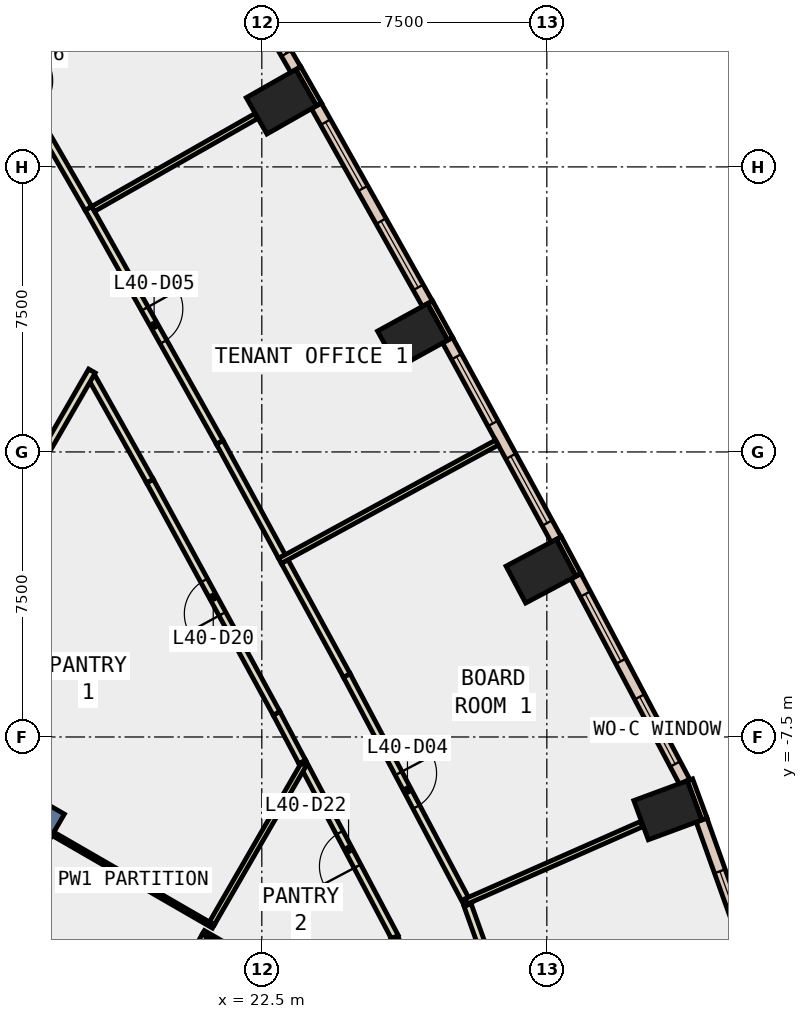
"""IFC4 building model, lengths in metres.
Left out: names, types, materials, properties, quantities, classifications, styles, units other than length and angle.
Written with IfcOpenShell. Run it as: python <this file> out.ifc"""

import sys

from ifc_helpers import new_model, si_unit, direction, frame, frame_2d, origin, origin_2d, place, context, subcontext, project, spatial, rectangle, extrude, element, fill, save


model = new_model("IFC4")
c1 = context("Model", 3, precision=1e-05, world=origin(), true_north=direction((0.0, 1.0)))
c2 = subcontext(c1, "Body", "Model", "MODEL_VIEW")
j1 = project(units=[si_unit("LENGTHUNIT", "METRE"), si_unit("PLANEANGLEUNIT", "RADIAN")], contexts=[c1])
p1 = place(None, origin())
s1 = spatial("IfcSite", under=j1, at=p1, CompositionType="ELEMENT")
p2 = place(p1, origin())
s2 = spatial("IfcBuilding", under=s1, at=p2, CompositionType="ELEMENT")
p3 = place(p2, frame((0.0, 0.0, 180.2)))
s3 = spatial("IfcBuildingStorey", under=s2, at=p3, CompositionType="ELEMENT", Elevation=180.2)
for number, where, z_axis, x_axis in (
    (1, (33.183, -9.429, -0.4), (0.0, 0.0, 1.0), (-0.347, 0.938, 0.0)),
    (2, (29.847, -3.138, -0.4), (0.0, 0.0, 1.0), (-0.47, 0.883, 0.0)),
    (3, (26.468, 3.059, -0.4), (0.0, 0.0, 1.0), (-0.482, 0.876, 0.0)),
    (4, (23.015, 9.214, -0.4), (0.0, 0.0, 1.0), (-0.494, 0.869, 0.0)),
):
    element("IfcColumn", number, at=place(p3, frame(where, z_axis=z_axis, x_axis=x_axis)), inside=s3, PredefinedType="COLUMN", context=c2, shape_type="SweptSolid", body=[
        extrude(rectangle(XDim=1.1, YDim=1.5, at=origin_2d()), origin(), (0.0, 0.0, 1.0), 4.0),
    ])
p4 = place(p3, frame((9.31, -5.375, -0.4), z_axis=(0.0, 0.0, 1.0), x_axis=(0.866017533419, -0.500013631625, 0.0)))
e5 = element("IfcWall", 5, at=p4, inside=s3, PredefinedType="SHEAR", context=c2, shape_type="SweptSolid", body=[
    extrude(rectangle(XDim=9.0, YDim=0.8, at=frame_2d((4.5, 0.0))), origin(), (0.0, 0.0, 1.0), 4.0),
])
p5 = place(p3, frame((34.147, -9.659, 0.0), z_axis=(0.0, 0.0, 1.0), x_axis=(-0.346229846278, 0.938149718087, 0.0)))
e6 = element("IfcWall", 6, at=p5, inside=s3, PredefinedType="STANDARD", context=c2, shape_type="SweptSolid", body=[
    extrude(rectangle(XDim=1.1, YDim=0.15, at=frame_2d((0.55, 0.0))), origin(), (0.0, 0.0, 1.0), 3.6),
])
p6 = place(p3, frame((30.833, -3.236, 0.0), z_axis=(0.0, 0.0, 1.0), x_axis=(-0.469966207956, 0.882684407577, 0.0)))
e7 = element("IfcWall", 7, at=p6, inside=s3, PredefinedType="STANDARD", context=c2, shape_type="SweptSolid", body=[
    extrude(rectangle(XDim=1.1, YDim=0.15, at=frame_2d((0.55, 0.0))), origin(), (0.0, 0.0, 1.0), 3.6),
])
p7 = place(p3, frame((27.456, 2.975, 0.0), z_axis=(0.0, 0.0, 1.0), x_axis=(-0.481850587491, 0.876253394478, 0.0)))
e8 = element("IfcWall", 8, at=p7, inside=s3, PredefinedType="STANDARD", context=c2, shape_type="SweptSolid", body=[
    extrude(rectangle(XDim=1.1, YDim=0.15, at=frame_2d((0.55, 0.0))), origin(), (0.0, 0.0, 1.0), 3.6),
])
p8 = place(p3, frame((24.005, 9.144, 0.0), z_axis=(0.0, 0.0, 1.0), x_axis=(-0.494512685492, 0.869170411305, 0.0)))
e9 = element("IfcWall", 9, at=p8, inside=s3, PredefinedType="STANDARD", context=c2, shape_type="SweptSolid", body=[
    extrude(rectangle(XDim=1.1, YDim=0.15, at=frame_2d((0.55, 0.0))), origin(), (0.0, 0.0, 1.0), 3.6),
])
p9 = place(p3, frame((35.506, -13.7, 0.0), z_axis=(0.0, 0.0, 1.0), x_axis=(-0.336652028742, 0.941629126325, 0.0)))
e10 = element("IfcWall", 10, at=p9, inside=s3, PredefinedType="STANDARD", context=c2, shape_type="SweptSolid", body=[
    extrude(rectangle(XDim=4.263, YDim=0.3, at=frame_2d((2.131, 0.0))), origin(), (0.0, 0.0, 1.0), 3.6),
])
p10 = place(p9, frame((1.431, 0.0, 0.9)))
e11 = element("IfcOpeningElement", 11, at=p10, cuts=e10, PredefinedType="OPENING", context=c2, shape_type="SweptSolid", body=[
    extrude(rectangle(XDim=1.4, YDim=2.6, at=frame_2d((0.7, 1.3))), frame((0.0, 0.16, 0.0), z_axis=(0.0, -1.0, 0.0), x_axis=(1.0, 0.0, 0.0)), (0.0, 0.0, 1.0), 0.32),
])
p11 = place(p3, frame((33.626, -8.68, 0.0), z_axis=(0.0, 0.0, 1.0), x_axis=(-0.467572383403, 0.883954787463, 0.0)))
e12 = element("IfcWall", 12, at=p11, inside=s3, PredefinedType="STANDARD", context=c2, shape_type="SweptSolid", body=[
    extrude(rectangle(XDim=6.119, YDim=0.3, at=frame_2d((3.06, 0.0))), origin(), (0.0, 0.0, 1.0), 3.6),
])
p12 = place(p11, frame((0.53, 0.0, 0.9)))
e13 = element("IfcOpeningElement", 13, at=p12, cuts=e12, PredefinedType="OPENING", context=c2, shape_type="SweptSolid", body=[
    extrude(rectangle(XDim=2.0, YDim=2.6, at=frame_2d((1.0, 1.3))), frame((0.0, 0.16, 0.0), z_axis=(0.0, -1.0, 0.0), x_axis=(1.0, 0.0, 0.0)), (0.0, 0.0, 1.0), 0.32),
])
p13 = place(p11, frame((3.589, 0.0, 0.9)))
e14 = element("IfcOpeningElement", 14, at=p13, cuts=e12, PredefinedType="OPENING", context=c2, shape_type="SweptSolid", body=[
    extrude(rectangle(XDim=2.0, YDim=2.6, at=frame_2d((1.0, 1.3))), frame((0.0, 0.16, 0.0), z_axis=(0.0, -1.0, 0.0), x_axis=(1.0, 0.0, 0.0)), (0.0, 0.0, 1.0), 0.32),
])
p14 = place(p3, frame((30.246, -2.303, 0.0), z_axis=(0.0, 0.0, 1.0), x_axis=(-0.478711740571, 0.877972134774, 0.0)))
e15 = element("IfcWall", 15, at=p14, inside=s3, PredefinedType="STANDARD", context=c2, shape_type="SweptSolid", body=[
    extrude(rectangle(XDim=5.97, YDim=0.3, at=frame_2d((2.985, 0.0))), origin(), (0.0, 0.0, 1.0), 3.6),
])
p15 = place(p14, frame((0.493, 0.0, 0.9)))
e16 = element("IfcOpeningElement", 16, at=p15, cuts=e15, PredefinedType="OPENING", context=c2, shape_type="SweptSolid", body=[
    extrude(rectangle(XDim=2.0, YDim=2.6, at=frame_2d((1.0, 1.3))), frame((0.0, 0.16, 0.0), z_axis=(0.0, -1.0, 0.0), x_axis=(1.0, 0.0, 0.0)), (0.0, 0.0, 1.0), 0.32),
])
p16 = place(p14, frame((3.478, 0.0, 0.9)))
e17 = element("IfcOpeningElement", 17, at=p16, cuts=e15, PredefinedType="OPENING", context=c2, shape_type="SweptSolid", body=[
    extrude(rectangle(XDim=2.0, YDim=2.6, at=frame_2d((1.0, 1.3))), frame((0.0, 0.16, 0.0), z_axis=(0.0, -1.0, 0.0), x_axis=(1.0, 0.0, 0.0)), (0.0, 0.0, 1.0), 0.32),
])
p17 = place(p3, frame((26.857, 3.9, 0.0), z_axis=(0.0, 0.0, 1.0), x_axis=(-0.489305602904, 0.872112393541, 0.0)))
e18 = element("IfcWall", 18, at=p17, inside=s3, PredefinedType="STANDARD", context=c2, shape_type="SweptSolid", body=[
    extrude(rectangle(XDim=5.969, YDim=0.3, at=frame_2d((2.985, 0.0))), origin(), (0.0, 0.0, 1.0), 3.6),
])
p18 = place(p17, frame((0.492, 0.0, 0.9)))
e19 = element("IfcOpeningElement", 19, at=p18, cuts=e18, PredefinedType="OPENING", context=c2, shape_type="SweptSolid", body=[
    extrude(rectangle(XDim=2.0, YDim=2.6, at=frame_2d((1.0, 1.3))), frame((0.0, 0.16, 0.0), z_axis=(0.0, -1.0, 0.0), x_axis=(1.0, 0.0, 0.0)), (0.0, 0.0, 1.0), 0.32),
])
p19 = place(p17, frame((3.477, 0.0, 0.9)))
e20 = element("IfcOpeningElement", 20, at=p19, cuts=e18, PredefinedType="OPENING", context=c2, shape_type="SweptSolid", body=[
    extrude(rectangle(XDim=2.0, YDim=2.6, at=frame_2d((1.0, 1.3))), frame((0.0, 0.16, 0.0), z_axis=(0.0, -1.0, 0.0), x_axis=(1.0, 0.0, 0.0)), (0.0, 0.0, 1.0), 0.32),
])
p20 = place(p3, frame((23.393, 10.06, 0.0), z_axis=(0.0, 0.0, 1.0), x_axis=(-0.499908916093, 0.866077984716, 0.0)))
e21 = element("IfcWall", 21, at=p20, inside=s3, PredefinedType="STANDARD", context=c2, shape_type="SweptSolid", body=[
    extrude(rectangle(XDim=5.969, YDim=0.3, at=frame_2d((2.985, 0.0))), origin(), (0.0, 0.0, 1.0), 3.6),
])
p21 = place(p20, frame((0.492, 0.0, 0.9)))
e22 = element("IfcOpeningElement", 22, at=p21, cuts=e21, PredefinedType="OPENING", context=c2, shape_type="SweptSolid", body=[
    extrude(rectangle(XDim=2.0, YDim=2.6, at=frame_2d((1.0, 1.3))), frame((0.0, 0.16, 0.0), z_axis=(0.0, -1.0, 0.0), x_axis=(1.0, 0.0, 0.0)), (0.0, 0.0, 1.0), 0.32),
])
p22 = place(p20, frame((3.477, 0.0, 0.9)))
e23 = element("IfcOpeningElement", 23, at=p22, cuts=e21, PredefinedType="OPENING", context=c2, shape_type="SweptSolid", body=[
    extrude(rectangle(XDim=2.0, YDim=2.6, at=frame_2d((1.0, 1.3))), frame((0.0, 0.16, 0.0), z_axis=(0.0, -1.0, 0.0), x_axis=(1.0, 0.0, 0.0)), (0.0, 0.0, 1.0), 0.32),
])
p23 = place(p3, frame((23.565, -8.158, 0.0), z_axis=(0.0, 0.0, 1.0), x_axis=(-0.46753134131, 0.883976495668, 0.0)))
e24 = element("IfcWall", 24, at=p23, inside=s3, PredefinedType="PARTITIONING", context=c2, shape_type="SweptSolid", body=[
    extrude(rectangle(XDim=1.448, YDim=0.2, at=frame_2d((0.724, 0.0))), origin(), (0.0, 0.0, 1.0), 3.6),
])
p24 = place(p3, frame((22.888, -6.878, 0.0), z_axis=(0.0, 0.0, 1.0), x_axis=(-0.478665365973, 0.877997418799, 0.0)))
e25 = element("IfcWall", 25, at=p24, inside=s3, PredefinedType="PARTITIONING", context=c2, shape_type="SweptSolid", body=[
    extrude(rectangle(XDim=6.961, YDim=0.2, at=frame_2d((3.48, 0.0))), origin(), (0.0, 0.0, 1.0), 3.6),
])
p25 = place(p24, frame((2.981, 0.0, 0.0)))
e26 = element("IfcOpeningElement", 26, at=p25, cuts=e25, PredefinedType="OPENING", context=c2, shape_type="SweptSolid", body=[
    extrude(rectangle(XDim=1.0, YDim=2.1, at=frame_2d((0.5, 1.05))), frame((0.0, 0.11, 0.0), z_axis=(0.0, -1.0, 0.0), x_axis=(1.0, 0.0, 0.0)), (0.0, 0.0, 1.0), 0.22),
])
p26 = place(p3, frame((19.556, -0.766, 0.0), z_axis=(0.0, 0.0, 1.0), x_axis=(-0.489198731197, 0.872172346154, 0.0)))
e27 = element("IfcWall", 27, at=p26, inside=s3, PredefinedType="PARTITIONING", context=c2, shape_type="SweptSolid", body=[
    extrude(rectangle(XDim=3.121, YDim=0.2, at=frame_2d((1.561, 0.0))), origin(), (0.0, 0.0, 1.0), 3.6),
])
p27 = place(p3, frame((26.758, -14.926, 0.0), z_axis=(0.0, 0.0, 1.0), x_axis=(-0.33645112914, 0.941700927949, 0.0)))
e28 = element("IfcWall", 28, at=p27, inside=s3, PredefinedType="PARTITIONING", context=c2, shape_type="SweptSolid", body=[
    extrude(rectangle(XDim=2.292, YDim=0.2, at=frame_2d((1.146, 0.0))), origin(), (0.0, 0.0, 1.0), 3.6),
])
p28 = place(p3, frame((26.0, -12.762, 0.0), z_axis=(0.0, 0.0, 1.0), x_axis=(-0.467534471159, 0.883974840297, 0.0)))
e29 = element("IfcWall", 29, at=p28, inside=s3, PredefinedType="PARTITIONING", context=c2, shape_type="SweptSolid", body=[
    extrude(rectangle(XDim=5.208, YDim=0.2, at=frame_2d((2.604, 0.0))), origin(), (0.0, 0.0, 1.0), 3.6),
])
p29 = place(p28, frame((2.104, 0.0, 0.0)))
e30 = element("IfcOpeningElement", 30, at=p29, cuts=e29, PredefinedType="OPENING", context=c2, shape_type="SweptSolid", body=[
    extrude(rectangle(XDim=1.0, YDim=2.1, at=frame_2d((0.5, 1.05))), frame((0.0, 0.11, 0.0), z_axis=(0.0, -1.0, 0.0), x_axis=(1.0, 0.0, 0.0)), (0.0, 0.0, 1.0), 0.22),
])
p30 = place(p3, frame((27.913, -11.919, 0.0), z_axis=(0.0, 0.0, 1.0), x_axis=(0.336864004528, -0.941553313654, 0.0)))
e31 = element("IfcWall", 31, at=p30, inside=s3, PredefinedType="PARTITIONING", context=c2, shape_type="SweptSolid", body=[
    extrude(rectangle(XDim=3.048, YDim=0.2, at=frame_2d((1.524, 0.0))), origin(), (0.0, 0.0, 1.0), 3.6),
])
p31 = place(p3, frame((23.102, -2.884, 0.0), z_axis=(0.0, 0.0, 1.0), x_axis=(0.478646929322, -0.878007469815, 0.0)))
e32 = element("IfcWall", 32, at=p31, inside=s3, PredefinedType="PARTITIONING", context=c2, shape_type="SweptSolid", body=[
    extrude(rectangle(XDim=3.418, YDim=0.2, at=frame_2d((1.709, 0.0))), origin(), (0.0, 0.0, 1.0), 3.6),
])
p32 = place(p3, frame((24.738, -5.885, 0.0), z_axis=(0.0, 0.0, 1.0), x_axis=(0.467616297571, -0.883931557444, 0.0)))
e33 = element("IfcWall", 33, at=p32, inside=s3, PredefinedType="PARTITIONING", context=c2, shape_type="SweptSolid", body=[
    extrude(rectangle(XDim=6.82, YDim=0.2, at=frame_2d((3.41, 0.0))), origin(), (0.0, 0.0, 1.0), 3.6),
])
p33 = place(p32, frame((2.91, 0.0, 0.0)))
e34 = element("IfcOpeningElement", 34, at=p33, cuts=e33, PredefinedType="OPENING", context=c2, shape_type="SweptSolid", body=[
    extrude(rectangle(XDim=1.0, YDim=2.1, at=frame_2d((0.5, 1.05))), frame((0.0, 0.11, 0.0), z_axis=(0.0, -1.0, 0.0), x_axis=(1.0, 0.0, 0.0)), (0.0, 0.0, 1.0), 0.22),
])
p34 = place(p3, frame((17.938, 6.411, 0.0), z_axis=(0.0, 0.0, 1.0), x_axis=(0.48930419744, -0.872113182086, 0.0)))
e35 = element("IfcWall", 35, at=p34, inside=s3, PredefinedType="PARTITIONING", context=c2, shape_type="SweptSolid", body=[
    extrude(rectangle(XDim=7.063, YDim=0.2, at=frame_2d((3.532, 0.0))), origin(), (0.0, 0.0, 1.0), 3.6),
])
p35 = place(p34, frame((3.032, 0.0, 0.0)))
e36 = element("IfcOpeningElement", 36, at=p35, cuts=e35, PredefinedType="OPENING", context=c2, shape_type="SweptSolid", body=[
    extrude(rectangle(XDim=1.0, YDim=2.1, at=frame_2d((0.5, 1.05))), frame((0.0, 0.11, 0.0), z_axis=(0.0, -1.0, 0.0), x_axis=(1.0, 0.0, 0.0)), (0.0, 0.0, 1.0), 0.22),
])
p36 = place(p3, frame((21.394, 0.251, 0.0), z_axis=(0.0, 0.0, 1.0), x_axis=(0.478406883784, -0.878138288397, 0.0)))
e37 = element("IfcWall", 37, at=p36, inside=s3, PredefinedType="PARTITIONING", context=c2, shape_type="SweptSolid", body=[
    extrude(rectangle(XDim=3.42, YDim=0.2, at=frame_2d((1.71, 0.0))), origin(), (0.0, 0.0, 1.0), 3.6),
])
p37 = place(p3, frame((14.482, 12.395, 0.0), z_axis=(0.0, 0.0, 1.0), x_axis=(0.499953847993, -0.866052048018, 0.0)))
e38 = element("IfcWall", 38, at=p37, inside=s3, PredefinedType="PARTITIONING", context=c2, shape_type="SweptSolid", body=[
    extrude(rectangle(XDim=6.911, YDim=0.2, at=frame_2d((3.456, 0.0))), origin(), (0.0, 0.0, 1.0), 3.6),
])
p38 = place(p37, frame((3.03, 0.0, 0.0)))
e39 = element("IfcOpeningElement", 39, at=p38, cuts=e38, PredefinedType="OPENING", context=c2, shape_type="SweptSolid", body=[
    extrude(rectangle(XDim=1.0, YDim=2.1, at=frame_2d((0.5, 1.05))), frame((0.0, 0.11, 0.0), z_axis=(0.0, -1.0, 0.0), x_axis=(1.0, 0.0, 0.0)), (0.0, 0.0, 1.0), 0.22),
])
p39 = place(p3, frame((18.03, 2.13, 0.0), z_axis=(0.0, 0.0, 1.0), x_axis=(-0.499919790729, -0.866071707676, 0.0)))
e40 = element("IfcWall", 40, at=p39, inside=s3, PredefinedType="PARTITIONING", context=c2, shape_type="SweptSolid", body=[
    extrude(rectangle(XDim=10.46, YDim=0.2, at=frame_2d((5.23, 0.0))), origin(), (0.0, 0.0, 1.0), 3.6),
])
p40 = place(p3, frame((17.004, -10.047, 0.0), z_axis=(0.0, 0.0, 1.0), x_axis=(0.865997117979, -0.500048989253, 0.0)))
e41 = element("IfcWall", 41, at=p40, inside=s3, PredefinedType="PARTITIONING", context=c2, shape_type="SweptSolid", body=[
    extrude(rectangle(XDim=4.875, YDim=0.1, at=frame_2d((2.438, 0.0))), origin(), (0.0, 0.0, 1.0), 3.6),
])
p41 = place(p3, frame((21.004, -12.719, 0.0), z_axis=(0.0, 0.0, 1.0), x_axis=(-0.499877157623, -0.866096315249, 0.0)))
e42 = element("IfcWall", 42, at=p41, inside=s3, PredefinedType="PARTITIONING", context=c2, shape_type="SweptSolid", body=[
    extrude(rectangle(XDim=5.191, YDim=0.15, at=frame_2d((2.596, 0.0))), origin(), (0.0, 0.0, 1.0), 3.6),
])
p42 = place(p3, frame((23.6, -8.224, 0.0), z_axis=(0.0, 0.0, 1.0), x_axis=(-0.500120854176, -0.865955617349, 0.0)))
e43 = element("IfcWall", 43, at=p42, inside=s3, PredefinedType="PARTITIONING", context=c2, shape_type="SweptSolid", body=[
    extrude(rectangle(XDim=4.827, YDim=0.15, at=frame_2d((2.414, 0.0))), origin(), (0.0, 0.0, 1.0), 3.6),
])
p43 = place(p3, frame((20.964, -12.638, 0.0), z_axis=(0.0, 0.0, 1.0), x_axis=(0.865981737723, -0.500075624211, 0.0)))
e44 = element("IfcWall", 44, at=p43, inside=s3, PredefinedType="PARTITIONING", context=c2, shape_type="SweptSolid", body=[
    extrude(rectangle(XDim=6.203, YDim=0.1, at=frame_2d((3.102, 0.0))), origin(), (0.0, 0.0, 1.0), 3.6),
])
p44 = place(p3, frame((27.88, -11.825, 0.0), z_axis=(0.0, 0.0, 1.0), x_axis=(0.915110098234, 0.403204052696, 0.0)))
e45 = element("IfcWall", 45, at=p44, inside=s3, PredefinedType="PARTITIONING", context=c2, shape_type="SweptSolid", body=[
    extrude(rectangle(XDim=5.044, YDim=0.15, at=frame_2d((2.522, 0.0))), origin(), (0.0, 0.0, 1.0), 3.6),
])
p45 = place(p3, frame((22.978, -2.866, 0.0), z_axis=(0.0, 0.0, 1.0), x_axis=(0.878049098929, 0.478570558925, 0.0)))
e46 = element("IfcWall", 46, at=p45, inside=s3, PredefinedType="PARTITIONING", context=c2, shape_type="SweptSolid", body=[
    extrude(rectangle(XDim=6.501, YDim=0.15, at=frame_2d((3.25, 0.0))), origin(), (0.0, 0.0, 1.0), 3.6),
])
p46 = place(p3, frame((18.062, 6.395, 0.0), z_axis=(0.0, 0.0, 1.0), x_axis=(0.869113540562, 0.494612629854, 0.0)))
e47 = element("IfcWall", 47, at=p46, inside=s3, PredefinedType="PARTITIONING", context=c2, shape_type="SweptSolid", body=[
    extrude(rectangle(XDim=4.929, YDim=0.15, at=frame_2d((2.465, 0.0))), origin(), (0.0, 0.0, 1.0), 3.6),
])
p47 = place(p10, origin())
e48 = element("IfcWindow", 48, at=p47, inside=s3, PartitioningType="SINGLE_PANEL", PredefinedType="WINDOW", context=c2, shape_type="SweptSolid", body=[
    extrude(rectangle(XDim=1.4, YDim=2.6, at=frame_2d((0.7, 1.3))), frame((0.0, 0.03, 0.0), z_axis=(0.0, -1.0, 0.0), x_axis=(1.0, 0.0, 0.0)), (0.0, 0.0, 1.0), 0.06),
])
fill(e11, e48)
p48 = place(p12, origin())
e49 = element("IfcWindow", 49, at=p48, inside=s3, PartitioningType="SINGLE_PANEL", PredefinedType="WINDOW", context=c2, shape_type="SweptSolid", body=[
    extrude(rectangle(XDim=2.0, YDim=2.6, at=frame_2d((1.0, 1.3))), frame((0.0, 0.03, 0.0), z_axis=(0.0, -1.0, 0.0), x_axis=(1.0, 0.0, 0.0)), (0.0, 0.0, 1.0), 0.06),
])
fill(e13, e49)
p49 = place(p13, origin())
e50 = element("IfcWindow", 50, at=p49, inside=s3, PartitioningType="SINGLE_PANEL", PredefinedType="WINDOW", context=c2, shape_type="SweptSolid", body=[
    extrude(rectangle(XDim=2.0, YDim=2.6, at=frame_2d((1.0, 1.3))), frame((0.0, 0.03, 0.0), z_axis=(0.0, -1.0, 0.0), x_axis=(1.0, 0.0, 0.0)), (0.0, 0.0, 1.0), 0.06),
])
fill(e14, e50)
p50 = place(p15, origin())
e51 = element("IfcWindow", 51, at=p50, inside=s3, PartitioningType="SINGLE_PANEL", PredefinedType="WINDOW", context=c2, shape_type="SweptSolid", body=[
    extrude(rectangle(XDim=2.0, YDim=2.6, at=frame_2d((1.0, 1.3))), frame((0.0, 0.03, 0.0), z_axis=(0.0, -1.0, 0.0), x_axis=(1.0, 0.0, 0.0)), (0.0, 0.0, 1.0), 0.06),
])
fill(e16, e51)
p51 = place(p16, origin())
e52 = element("IfcWindow", 52, at=p51, inside=s3, PartitioningType="SINGLE_PANEL", PredefinedType="WINDOW", context=c2, shape_type="SweptSolid", body=[
    extrude(rectangle(XDim=2.0, YDim=2.6, at=frame_2d((1.0, 1.3))), frame((0.0, 0.03, 0.0), z_axis=(0.0, -1.0, 0.0), x_axis=(1.0, 0.0, 0.0)), (0.0, 0.0, 1.0), 0.06),
])
fill(e17, e52)
p52 = place(p18, origin())
e53 = element("IfcWindow", 53, at=p52, inside=s3, PartitioningType="SINGLE_PANEL", PredefinedType="WINDOW", context=c2, shape_type="SweptSolid", body=[
    extrude(rectangle(XDim=2.0, YDim=2.6, at=frame_2d((1.0, 1.3))), frame((0.0, 0.03, 0.0), z_axis=(0.0, -1.0, 0.0), x_axis=(1.0, 0.0, 0.0)), (0.0, 0.0, 1.0), 0.06),
])
fill(e19, e53)
p53 = place(p19, origin())
e54 = element("IfcWindow", 54, at=p53, inside=s3, PartitioningType="SINGLE_PANEL", PredefinedType="WINDOW", context=c2, shape_type="SweptSolid", body=[
    extrude(rectangle(XDim=2.0, YDim=2.6, at=frame_2d((1.0, 1.3))), frame((0.0, 0.03, 0.0), z_axis=(0.0, -1.0, 0.0), x_axis=(1.0, 0.0, 0.0)), (0.0, 0.0, 1.0), 0.06),
])
fill(e20, e54)
p54 = place(p21, origin())
e55 = element("IfcWindow", 55, at=p54, inside=s3, PartitioningType="SINGLE_PANEL", PredefinedType="WINDOW", context=c2, shape_type="SweptSolid", body=[
    extrude(rectangle(XDim=2.0, YDim=2.6, at=frame_2d((1.0, 1.3))), frame((0.0, 0.03, 0.0), z_axis=(0.0, -1.0, 0.0), x_axis=(1.0, 0.0, 0.0)), (0.0, 0.0, 1.0), 0.06),
])
fill(e22, e55)
p55 = place(p33, origin())
e56 = element("IfcDoor", 56, at=p55, inside=s3, OperationType="SINGLE_SWING_LEFT", PredefinedType="DOOR", context=c2, shape_type="SweptSolid", body=[
    extrude(rectangle(XDim=1.0, YDim=2.1, at=frame_2d((0.5, 1.05))), frame((0.0, 0.025, 0.0), z_axis=(0.0, -1.0, 0.0), x_axis=(1.0, 0.0, 0.0)), (0.0, 0.0, 1.0), 0.05),
])
fill(e34, e56)
p56 = place(p35, origin())
e57 = element("IfcDoor", 57, at=p56, inside=s3, OperationType="SINGLE_SWING_LEFT", PredefinedType="DOOR", context=c2, shape_type="SweptSolid", body=[
    extrude(rectangle(XDim=1.0, YDim=2.1, at=frame_2d((0.5, 1.05))), frame((0.0, 0.025, 0.0), z_axis=(0.0, -1.0, 0.0), x_axis=(1.0, 0.0, 0.0)), (0.0, 0.0, 1.0), 0.05),
])
fill(e36, e57)
p57 = place(p25, origin())
e58 = element("IfcDoor", 58, at=p57, inside=s3, OperationType="SINGLE_SWING_LEFT", PredefinedType="DOOR", context=c2, shape_type="SweptSolid", body=[
    extrude(rectangle(XDim=1.0, YDim=2.1, at=frame_2d((0.5, 1.05))), frame((0.0, 0.025, 0.0), z_axis=(0.0, -1.0, 0.0), x_axis=(1.0, 0.0, 0.0)), (0.0, 0.0, 1.0), 0.05),
])
fill(e26, e58)
p58 = place(p29, origin())
e59 = element("IfcDoor", 59, at=p58, inside=s3, OperationType="SINGLE_SWING_LEFT", PredefinedType="DOOR", context=c2, shape_type="SweptSolid", body=[
    extrude(rectangle(XDim=1.0, YDim=2.1, at=frame_2d((0.5, 1.05))), frame((0.0, 0.025, 0.0), z_axis=(0.0, -1.0, 0.0), x_axis=(1.0, 0.0, 0.0)), (0.0, 0.0, 1.0), 0.05),
])
fill(e30, e59)
save(model, sys.argv[1])
